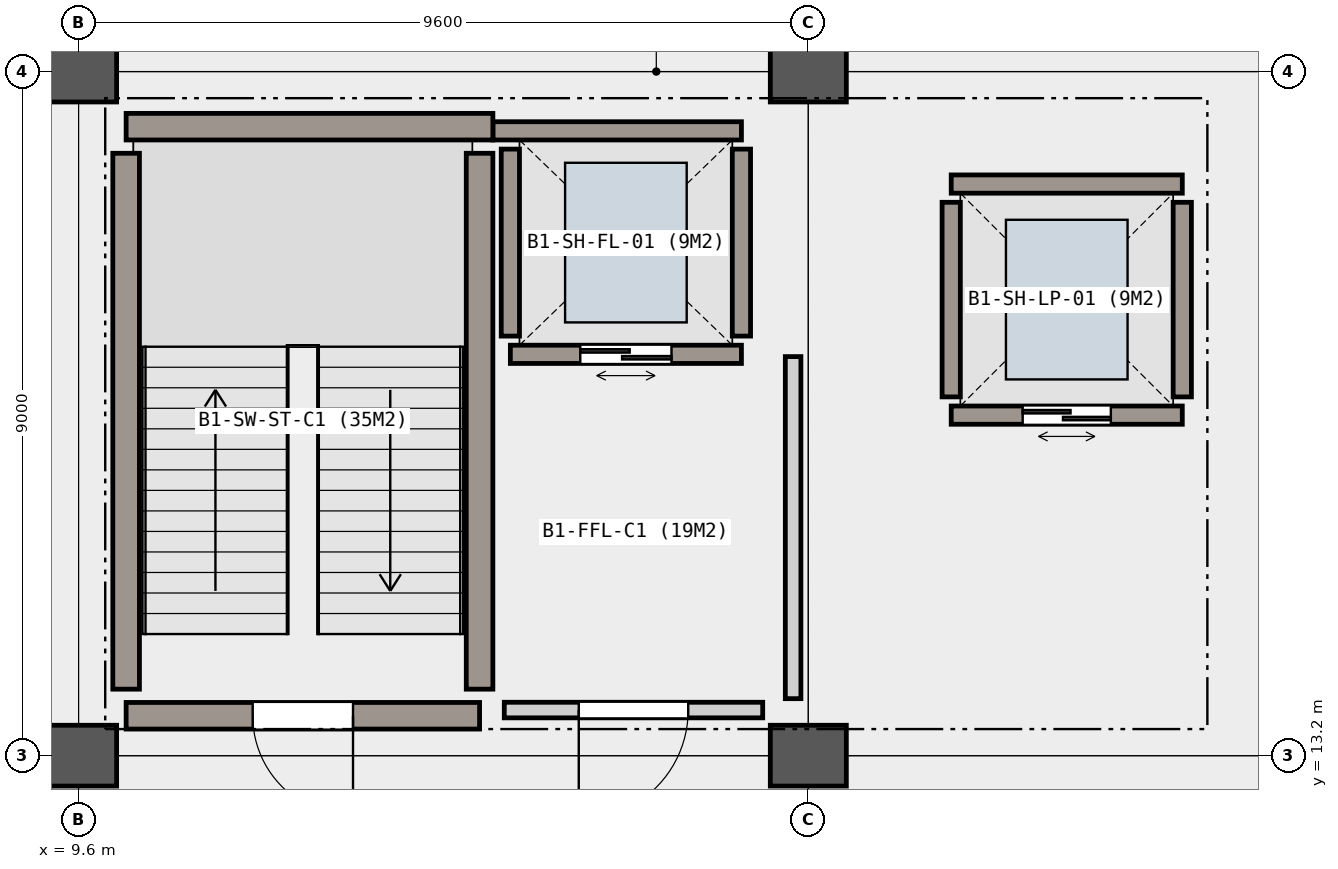
"""IFC4 building model, lengths in metres.
Left out: names, types, materials, properties, quantities, classifications, styles, units other than length and angle.
Written with IfcOpenShell. Run it as: python <this file> out.ifc"""

import sys

from ifc_helpers import new_model, si_unit, direction, frame, frame_2d, origin, origin_2d, place, context, subcontext, project, spatial, rectangle, extrude, element, fill, save


model = new_model("IFC4")
c1 = context("Model", 3, precision=1e-05, world=origin(), true_north=direction((0.0, 1.0)))
c2 = subcontext(c1, "Body", "Model", "MODEL_VIEW")
j1 = project(units=[si_unit("LENGTHUNIT", "METRE"), si_unit("PLANEANGLEUNIT", "RADIAN")], contexts=[c1])
p1 = place(None, origin())
s1 = spatial("IfcSite", under=j1, at=p1, CompositionType="ELEMENT")
p2 = place(p1, origin())
s2 = spatial("IfcBuilding", under=s1, at=p2, CompositionType="ELEMENT")
p3 = place(p2, frame((0.0, 0.0, -4.8)))
s3 = spatial("IfcBuildingStorey", under=s2, at=p3, CompositionType="ELEMENT", Elevation=-4.8)
for number, where, z_axis, x_axis in (
    (1, (9.6, 13.2, 0.0), (0.0, 0.0, 1.0), (1.0, 0.0, 0.0)),
    (2, (9.6, 22.2, 0.0), (0.0, 0.0, 1.0), (1.0, 0.0, 0.0)),
    (3, (19.2, 13.2, 0.0), (0.0, 0.0, 1.0), (1.0, 0.0, 0.0)),
    (4, (19.2, 22.2, 0.0), (0.0, 0.0, 1.0), (1.0, 0.0, 0.0)),
):
    element("IfcColumn", number, at=place(p3, frame(where, z_axis=z_axis, x_axis=x_axis)), inside=s3, PredefinedType="COLUMN", context=c2, shape_type="SweptSolid", body=[
        extrude(rectangle(XDim=1.0, YDim=0.8, at=origin_2d()), origin(), (0.0, 0.0, 1.0), 4.8),
    ])
p4 = place(p3, frame((18.32, 18.48, 0.0), z_axis=(0.0, 0.0, 1.0), x_axis=(-1.0, 0.0, 0.0)))
e5 = element("IfcWall", 5, at=p4, inside=s3, PredefinedType="SHEAR", context=c2, shape_type="SweptSolid", body=[
    extrude(rectangle(XDim=3.04, YDim=0.24, at=frame_2d((1.52, 0.0))), origin(), (0.0, 0.0, 1.0), 4.48),
])
p5 = place(p4, frame((0.92, 0.0, 0.0)))
e6 = element("IfcOpeningElement", 6, at=p5, cuts=e5, PredefinedType="OPENING", context=c2, shape_type="SweptSolid", body=[
    extrude(rectangle(XDim=1.2, YDim=2.15, at=frame_2d((0.6, 1.075))), frame((0.0, 0.13, 0.0), z_axis=(0.0, -1.0, 0.0), x_axis=(1.0, 0.0, 0.0)), (0.0, 0.0, 1.0), 0.26),
])
p6 = place(p3, frame((15.05, 21.42, 0.0), z_axis=(0.0, 0.0, 1.0), x_axis=(1.0, 0.0, 0.0)))
e7 = element("IfcWall", 7, at=p6, inside=s3, PredefinedType="SHEAR", context=c2, shape_type="SweptSolid", body=[
    extrude(rectangle(XDim=3.27, YDim=0.24, at=frame_2d((1.635, 0.0))), origin(), (0.0, 0.0, 1.0), 4.48),
])
for number, where, z_axis, x_axis in (
    (8, (15.28, 18.72, 0.0), (0.0, 0.0, 1.0), (0.0, 1.0, 0.0)),
    (9, (18.32, 21.18, 0.0), (0.0, 0.0, 1.0), (0.0, -1.0, 0.0)),
):
    element("IfcWall", number, at=place(p3, frame(where, z_axis=z_axis, x_axis=x_axis)), inside=s3, PredefinedType="SHEAR", context=c2, shape_type="SweptSolid", body=[
        extrude(rectangle(XDim=2.46, YDim=0.24, at=frame_2d((1.23, 0.0))), origin(), (0.0, 0.0, 1.0), 4.48),
    ])
p7 = place(p3, frame((24.12, 17.68, 0.0), z_axis=(0.0, 0.0, 1.0), x_axis=(-1.0, 0.0, 0.0)))
e10 = element("IfcWall", 10, at=p7, inside=s3, PredefinedType="SHEAR", context=c2, shape_type="SweptSolid", body=[
    extrude(rectangle(XDim=3.04, YDim=0.24, at=frame_2d((1.52, 0.0))), origin(), (0.0, 0.0, 1.0), 4.48),
])
p8 = place(p7, frame((0.94, 0.0, 0.0)))
e11 = element("IfcOpeningElement", 11, at=p8, cuts=e10, PredefinedType="OPENING", context=c2, shape_type="SweptSolid", body=[
    extrude(rectangle(XDim=1.16, YDim=2.15, at=frame_2d((0.58, 1.075))), frame((0.0, 0.13, 0.0), z_axis=(0.0, -1.0, 0.0), x_axis=(1.0, 0.0, 0.0)), (0.0, 0.0, 1.0), 0.26),
])
p9 = place(p3, frame((21.08, 20.72, 0.0), z_axis=(0.0, 0.0, 1.0), x_axis=(1.0, 0.0, 0.0)))
e12 = element("IfcWall", 12, at=p9, inside=s3, PredefinedType="SHEAR", context=c2, shape_type="SweptSolid", body=[
    extrude(rectangle(XDim=3.04, YDim=0.24, at=frame_2d((1.52, 0.0))), origin(), (0.0, 0.0, 1.0), 4.48),
])
for number, where, z_axis, x_axis in (
    (13, (21.08, 17.92, 0.0), (0.0, 0.0, 1.0), (0.0, 1.0, 0.0)),
    (14, (24.12, 20.48, 0.0), (0.0, 0.0, 1.0), (0.0, -1.0, 0.0)),
):
    element("IfcWall", number, at=place(p3, frame(where, z_axis=z_axis, x_axis=x_axis)), inside=s3, PredefinedType="SHEAR", context=c2, shape_type="SweptSolid", body=[
        extrude(rectangle(XDim=2.56, YDim=0.24, at=frame_2d((1.28, 0.0))), origin(), (0.0, 0.0, 1.0), 4.48),
    ])
p10 = place(p3, frame((14.875, 13.725, 0.0), z_axis=(0.0, 0.0, 1.0), x_axis=(-1.0, 0.0, 0.0)))
e15 = element("IfcWall", 15, at=p10, inside=s3, PredefinedType="SHEAR", context=c2, shape_type="SweptSolid", body=[
    extrude(rectangle(XDim=4.65, YDim=0.35, at=frame_2d((2.325, 0.0))), origin(), (0.0, 0.0, 1.0), 4.48),
])
p11 = place(p10, frame((1.665, 0.0, 0.0)))
e16 = element("IfcOpeningElement", 16, at=p11, cuts=e15, PredefinedType="OPENING", context=c2, shape_type="SweptSolid", body=[
    extrude(rectangle(XDim=1.32, YDim=2.15, at=frame_2d((0.66, 1.075))), frame((0.0, 0.185, 0.0), z_axis=(0.0, -1.0, 0.0), x_axis=(1.0, 0.0, 0.0)), (0.0, 0.0, 1.0), 0.37),
])
p12 = place(p3, frame((10.225, 21.475, 0.0), z_axis=(0.0, 0.0, 1.0), x_axis=(1.0, 0.0, 0.0)))
e17 = element("IfcWall", 17, at=p12, inside=s3, PredefinedType="SHEAR", context=c2, shape_type="SweptSolid", body=[
    extrude(rectangle(XDim=4.825, YDim=0.35, at=frame_2d((2.413, 0.0))), origin(), (0.0, 0.0, 1.0), 4.48),
])
for number, where, z_axis, x_axis in (
    (18, (10.225, 14.075, 0.0), (0.0, 0.0, 1.0), (0.0, 1.0, 0.0)),
    (19, (14.875, 21.125, 0.0), (0.0, 0.0, 1.0), (0.0, -1.0, 0.0)),
):
    element("IfcWall", number, at=place(p3, frame(where, z_axis=z_axis, x_axis=x_axis)), inside=s3, PredefinedType="SHEAR", context=c2, shape_type="SweptSolid", body=[
        extrude(rectangle(XDim=7.05, YDim=0.35, at=frame_2d((3.525, 0.0))), origin(), (0.0, 0.0, 1.0), 4.48),
    ])
p13 = place(p3, frame((18.6, 13.8, 0.0), z_axis=(0.0, 0.0, 1.0), x_axis=(-1.0, 0.0, 0.0)))
e20 = element("IfcWall", 20, at=p13, inside=s3, PredefinedType="PARTITIONING", context=c2, shape_type="SweptSolid", body=[
    extrude(rectangle(XDim=3.4, YDim=0.205, at=frame_2d((1.7, 0.0))), origin(), (0.0, 0.0, 1.0), 4.48),
])
p14 = place(p13, frame((0.98, 0.0, 0.0)))
e21 = element("IfcOpeningElement", 21, at=p14, cuts=e20, PredefinedType="OPENING", context=c2, shape_type="SweptSolid", body=[
    extrude(rectangle(XDim=1.44, YDim=2.18, at=frame_2d((0.72, 1.09))), frame((0.0, 0.113, 0.0), z_axis=(0.0, -1.0, 0.0), x_axis=(1.0, 0.0, 0.0)), (0.0, 0.0, 1.0), 0.225),
])
p15 = place(p3, frame((19.0, 18.45, 0.0), z_axis=(0.0, 0.0, 1.0), x_axis=(0.0, -1.0, 0.0)))
e22 = element("IfcWall", 22, at=p15, inside=s3, PredefinedType="PARTITIONING", context=c2, shape_type="SweptSolid", body=[
    extrude(rectangle(XDim=4.5, YDim=0.205, at=frame_2d((2.25, 0.0))), origin(), (0.0, 0.0, 1.0), 3.9),
])
p16 = place(p5, origin())
e23 = element("IfcDoor", 23, at=p16, inside=s3, OperationType="DOUBLE_DOOR_SLIDING", PredefinedType="DOOR", context=c2, shape_type="SweptSolid", body=[
    extrude(rectangle(XDim=1.2, YDim=2.15, at=frame_2d((0.6, 1.075))), frame((0.0, 0.025, 0.0), z_axis=(0.0, -1.0, 0.0), x_axis=(1.0, 0.0, 0.0)), (0.0, 0.0, 1.0), 0.05),
])
fill(e6, e23)
p17 = place(p8, origin())
e24 = element("IfcDoor", 24, at=p17, inside=s3, OperationType="DOUBLE_DOOR_SLIDING", PredefinedType="DOOR", context=c2, shape_type="SweptSolid", body=[
    extrude(rectangle(XDim=1.16, YDim=2.15, at=frame_2d((0.58, 1.075))), frame((0.0, 0.025, 0.0), z_axis=(0.0, -1.0, 0.0), x_axis=(1.0, 0.0, 0.0)), (0.0, 0.0, 1.0), 0.05),
])
fill(e11, e24)
p18 = place(p11, origin())
e25 = element("IfcDoor", 25, at=p18, inside=s3, OperationType="SINGLE_SWING_LEFT", PredefinedType="DOOR", context=c2, shape_type="SweptSolid", body=[
    extrude(rectangle(XDim=1.32, YDim=2.15, at=frame_2d((0.66, 1.075))), frame((0.0, 0.025, 0.0), z_axis=(0.0, -1.0, 0.0), x_axis=(1.0, 0.0, 0.0)), (0.0, 0.0, 1.0), 0.05),
])
fill(e16, e25)
p19 = place(p14, origin())
e26 = element("IfcDoor", 26, at=p19, inside=s3, OperationType="SINGLE_SWING_RIGHT", PredefinedType="DOOR", context=c2, shape_type="SweptSolid", body=[
    extrude(rectangle(XDim=1.44, YDim=2.18, at=frame_2d((0.72, 1.09))), frame((0.0, 0.025, 0.0), z_axis=(0.0, -1.0, 0.0), x_axis=(1.0, 0.0, 0.0)), (0.0, 0.0, 1.0), 0.05),
])
fill(e21, e26)
save(model, sys.argv[1])
